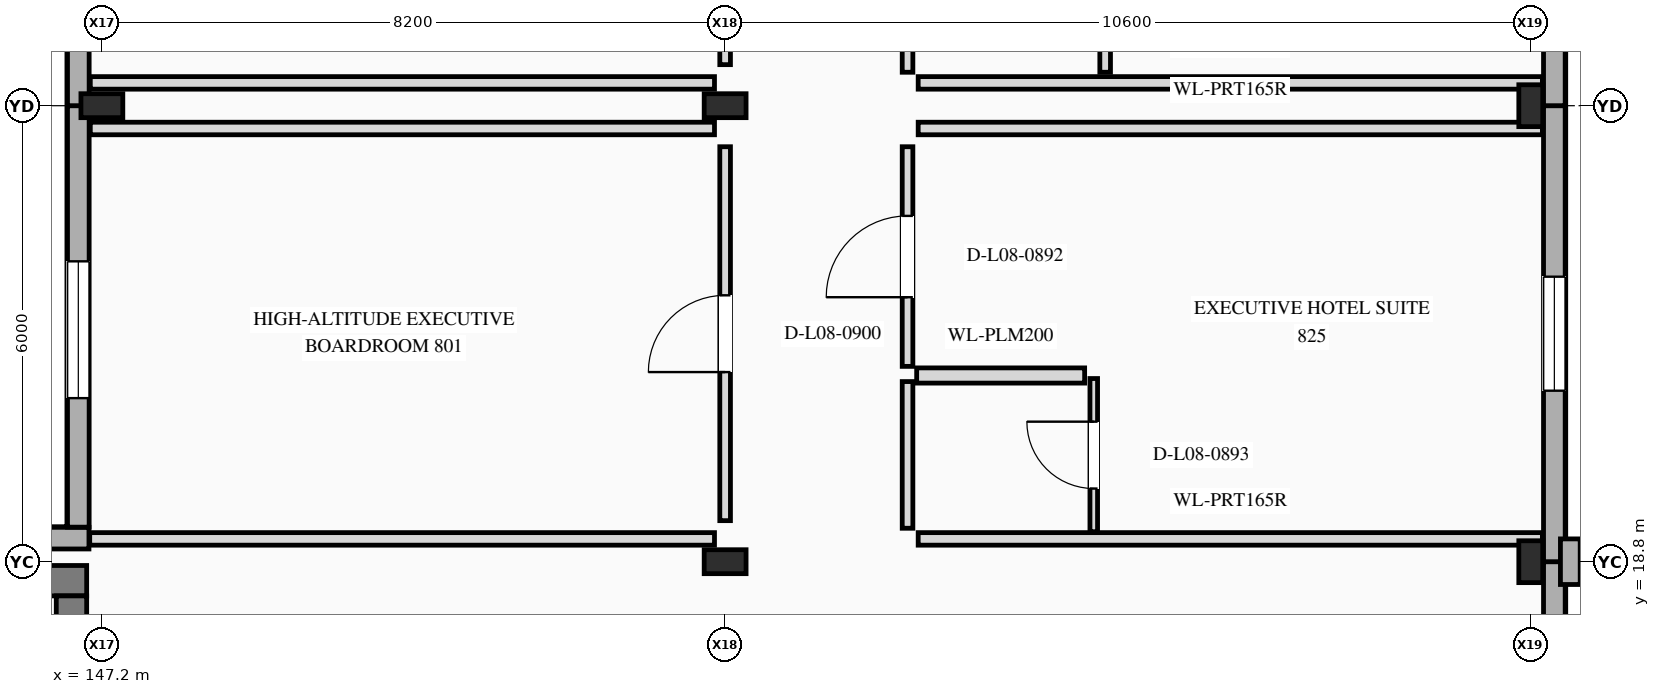
"""IFC4 building model, lengths in metres.
Left out: names, types, materials, properties, quantities, classifications, styles, units other than length and angle.
Written with IfcOpenShell. Run it as: python <this file> out.ifc"""

import sys

from ifc_helpers import new_model, si_unit, direction, frame, frame_2d, origin, origin_2d, place, context, subcontext, project, spatial, rectangle, i_section, extrude, element, fill, save


model = new_model("IFC4")
c1 = context("Model", 3, precision=1e-05, world=origin(), true_north=direction((0.0, 1.0)))
c2 = subcontext(c1, "Body", "Model", "MODEL_VIEW")
j1 = project(units=[si_unit("LENGTHUNIT", "METRE"), si_unit("PLANEANGLEUNIT", "RADIAN")], contexts=[c1])
p1 = place(None, origin())
s1 = spatial("IfcSite", under=j1, at=p1, CompositionType="ELEMENT")
p2 = place(p1, origin())
s2 = spatial("IfcBuilding", under=s1, at=p2, CompositionType="ELEMENT")
p3 = place(p2, frame((0.0, 0.0, 34.1)))
s3 = spatial("IfcBuildingStorey", under=s2, at=p3, CompositionType="ELEMENT", Elevation=34.1)
for number, where, z_axis, x_axis in (
    (1, (147.2, 24.8, 0.0), (0.0, 0.0, 1.0), (0.0, 1.0, 0.0)),
    (2, (155.4, 18.8, 0.0), (0.0, 0.0, 1.0), (0.0, 1.0, 0.0)),
    (3, (155.4, 24.8, 0.0), (0.0, 0.0, 1.0), (0.0, 1.0, 0.0)),
    (4, (166.0, 18.8, 0.0), (0.0, 0.0, 1.0), (1.0, 0.0, 0.0)),
    (5, (166.0, 24.8, 0.0), (0.0, 0.0, 1.0), (1.0, 0.0, 0.0)),
):
    element("IfcColumn", number, at=place(p3, frame(where, z_axis=z_axis, x_axis=x_axis)), inside=s3, PredefinedType="COLUMN", context=c2, shape_type="SweptSolid", body=[
        extrude(i_section(OverallWidth=0.315, OverallDepth=0.551, WebThickness=0.015, FlangeThickness=0.024, at=origin_2d()), origin(), (0.0, 0.0, 1.0), 3.5),
    ])
p4 = place(p3, frame((166.31, 8.2, 0.0), z_axis=(0.0, 0.0, 1.0), x_axis=(0.0, 1.0, 0.0)))
e6 = element("IfcWall", 6, at=p4, inside=s3, PredefinedType="STANDARD", context=c2, shape_type="SweptSolid", body=[
    extrude(rectangle(XDim=10.6, YDim=0.285, at=frame_2d((5.3, 0.0))), origin(), (0.0, 0.0, 1.0), 3.5),
])
p5 = place(p4, frame((4.55, 0.0, 0.88)))
e7 = element("IfcOpeningElement", 7, at=p5, cuts=e6, PredefinedType="OPENING", context=c2, shape_type="SweptSolid", body=[
    extrude(rectangle(XDim=1.5, YDim=1.7, at=frame_2d((0.75, 0.85))), frame((0.0, 0.152, 0.0), z_axis=(0.0, -1.0, 0.0), x_axis=(1.0, 0.0, 0.0)), (0.0, 0.0, 1.0), 0.305),
])
p6 = place(p3, frame((166.31, 18.8, 0.0), z_axis=(0.0, 0.0, 1.0), x_axis=(0.0, 1.0, 0.0)))
e8 = element("IfcWall", 8, at=p6, inside=s3, PredefinedType="STANDARD", context=c2, shape_type="SweptSolid", body=[
    extrude(rectangle(XDim=6.0, YDim=0.285, at=frame_2d((3.0, 0.0))), origin(), (0.0, 0.0, 1.0), 3.5),
])
p7 = place(p6, frame((2.25, 0.0, 0.85)))
e9 = element("IfcOpeningElement", 9, at=p7, cuts=e8, PredefinedType="OPENING", context=c2, shape_type="SweptSolid", body=[
    extrude(rectangle(XDim=1.5, YDim=1.7, at=frame_2d((0.75, 0.85))), frame((0.0, 0.152, 0.0), z_axis=(0.0, -1.0, 0.0), x_axis=(1.0, 0.0, 0.0)), (0.0, 0.0, 1.0), 0.305),
])
p8 = place(p3, frame((166.52, 18.5, 0.0), z_axis=(0.0, 0.0, 1.0), x_axis=(0.0, 1.0, 0.0)))
e10 = element("IfcWall", 10, at=p8, inside=s3, PredefinedType="ELEMENTEDWALL", context=c2, shape_type="SweptSolid", body=[
    extrude(rectangle(XDim=0.6, YDim=0.26, at=frame_2d((0.3, 0.0))), origin(), (0.0, 0.0, 1.0), 3.5),
])
p9 = place(p3, frame((166.31, 24.8, 0.0), z_axis=(0.0, 0.0, 1.0), x_axis=(0.0, 1.0, 0.0)))
e11 = element("IfcWall", 11, at=p9, inside=s3, PredefinedType="STANDARD", context=c2, shape_type="SweptSolid", body=[
    extrude(rectangle(XDim=1.34, YDim=0.285, at=frame_2d((0.67, 0.0))), origin(), (0.0, 0.0, 1.0), 3.5),
])
p10 = place(p3, frame((147.03, 19.11, 0.0), z_axis=(0.0, 0.0, 1.0), x_axis=(-1.0, 0.0, 0.0)))
e12 = element("IfcWall", 12, at=p10, inside=s3, PredefinedType="STANDARD", context=c2, shape_type="SweptSolid", body=[
    extrude(rectangle(XDim=11.03, YDim=0.285, at=frame_2d((5.515, 0.0))), origin(), (0.0, 0.0, 1.0), 3.5),
])
p11 = place(p3, frame((146.89, 19.254, 0.0), z_axis=(0.0, 0.0, 1.0), x_axis=(0.0, 1.0, 0.0)))
e13 = element("IfcWall", 13, at=p11, inside=s3, PredefinedType="STANDARD", context=c2, shape_type="SweptSolid", body=[
    extrude(rectangle(XDim=5.546, YDim=0.285, at=frame_2d((2.773, 0.0))), origin(), (0.0, 0.0, 1.0), 3.5),
])
p12 = place(p11, frame((1.698, 0.0, 0.85)))
e14 = element("IfcOpeningElement", 14, at=p12, cuts=e13, PredefinedType="OPENING", context=c2, shape_type="SweptSolid", body=[
    extrude(rectangle(XDim=1.8, YDim=1.8, at=frame_2d((0.9, 0.9))), frame((0.0, 0.152, 0.0), z_axis=(0.0, -1.0, 0.0), x_axis=(1.0, 0.0, 0.0)), (0.0, 0.0, 1.0), 0.305),
])
p13 = place(p3, frame((146.89, 24.8, 0.0), z_axis=(0.0, 0.0, 1.0), x_axis=(0.0, 1.0, 0.0)))
e15 = element("IfcWall", 15, at=p13, inside=s3, PredefinedType="STANDARD", context=c2, shape_type="SweptSolid", body=[
    extrude(rectangle(XDim=8.4, YDim=0.285, at=frame_2d((4.2, 0.0))), origin(), (0.0, 0.0, 1.0), 3.5),
])
p14 = place(p13, frame((3.225, 0.0, 0.85)))
e16 = element("IfcOpeningElement", 16, at=p14, cuts=e15, PredefinedType="OPENING", context=c2, shape_type="SweptSolid", body=[
    extrude(rectangle(XDim=1.95, YDim=1.85, at=frame_2d((0.975, 0.925))), frame((0.0, 0.152, 0.0), z_axis=(0.0, -1.0, 0.0), x_axis=(1.0, 0.0, 0.0)), (0.0, 0.0, 1.0), 0.305),
])
p15 = place(p3, frame((147.0, 18.55, 0.0), z_axis=(0.0, 0.0, 1.0), x_axis=(-1.0, 0.0, 0.0)))
e17 = element("IfcWall", 17, at=p15, inside=s3, PredefinedType="SHEAR", context=c2, shape_type="SweptSolid", body=[
    extrude(rectangle(XDim=10.6, YDim=0.4, at=frame_2d((5.3, 0.0))), origin(), (0.0, 0.0, 1.0), 3.5),
])
p16 = place(p3, frame((146.8, 11.0, 0.0), z_axis=(0.0, 0.0, 1.0), x_axis=(0.0, 1.0, 0.0)))
e18 = element("IfcWall", 18, at=p16, inside=s3, PredefinedType="SHEAR", context=c2, shape_type="SweptSolid", body=[
    extrude(rectangle(XDim=7.35, YDim=0.4, at=frame_2d((3.675, 0.0))), origin(), (0.0, 0.0, 1.0), 3.5),
])
p17 = place(p16, frame((5.0, 0.0, 0.0)))
e19 = element("IfcOpeningElement", 19, at=p17, cuts=e18, PredefinedType="OPENING", context=c2, shape_type="SweptSolid", body=[
    extrude(rectangle(XDim=0.95, YDim=2.2, at=frame_2d((0.475, 1.1))), frame((0.0, 0.21, 0.0), z_axis=(0.0, -1.0, 0.0), x_axis=(1.0, 0.0, 0.0)), (0.0, 0.0, 1.0), 0.42),
])
p18 = place(p16, frame((0.175, 0.0, 0.0)))
e20 = element("IfcOpeningElement", 20, at=p18, cuts=e18, PredefinedType="OPENING", context=c2, shape_type="SweptSolid", body=[
    extrude(rectangle(XDim=1.15, YDim=2.25, at=frame_2d((0.575, 1.125))), frame((0.0, 0.21, 0.0), z_axis=(0.0, -1.0, 0.0), x_axis=(1.0, 0.0, 0.0)), (0.0, 0.0, 1.0), 0.42),
])
p19 = place(p16, frame((1.875, 0.0, 0.0)))
e21 = element("IfcOpeningElement", 21, at=p19, cuts=e18, PredefinedType="OPENING", context=c2, shape_type="SweptSolid", body=[
    extrude(rectangle(XDim=1.15, YDim=2.25, at=frame_2d((0.575, 1.125))), frame((0.0, 0.21, 0.0), z_axis=(0.0, -1.0, 0.0), x_axis=(1.0, 0.0, 0.0)), (0.0, 0.0, 1.0), 0.42),
])
p20 = place(p3, frame((157.8, 19.24, 0.0), z_axis=(0.0, 0.0, 1.0), x_axis=(0.0, 1.0, 0.0)))
e22 = element("IfcWall", 22, at=p20, inside=s3, PredefinedType="PARTITIONING", context=c2, shape_type="SweptSolid", body=[
    extrude(rectangle(XDim=1.93, YDim=0.14, at=frame_2d((0.965, 0.0))), origin(), (0.0, 0.0, 1.0), 2.748),
])
p21 = place(p3, frame((157.8, 21.37, 0.0), z_axis=(0.0, 0.0, 1.0), x_axis=(0.0, 1.0, 0.0)))
e23 = element("IfcWall", 23, at=p21, inside=s3, PredefinedType="PARTITIONING", context=c2, shape_type="SweptSolid", body=[
    extrude(rectangle(XDim=2.89, YDim=0.14, at=frame_2d((1.445, 0.0))), origin(), (0.0, 0.0, 1.0), 2.748),
])
p22 = place(p21, frame((0.91, 0.0, 0.0)))
e24 = element("IfcOpeningElement", 24, at=p22, cuts=e23, PredefinedType="OPENING", context=c2, shape_type="SweptSolid", body=[
    extrude(rectangle(XDim=1.07, YDim=2.4, at=frame_2d((0.535, 1.2))), frame((0.0, 0.08, 0.0), z_axis=(0.0, -1.0, 0.0), x_axis=(1.0, 0.0, 0.0)), (0.0, 0.0, 1.0), 0.16),
])
for number, where, z_axis, x_axis in (
    (25, (157.94, 19.1, 0.0), (0.0, 0.0, 1.0), (1.0, 0.0, 0.0)),
    (26, (157.94, 24.5, 0.0), (0.0, 0.0, 1.0), (1.0, 0.0, 0.0)),
):
    element("IfcWall", number, at=place(p3, frame(where, z_axis=z_axis, x_axis=x_axis)), inside=s3, PredefinedType="PARTITIONING", context=c2, shape_type="SweptSolid", body=[
        extrude(rectangle(XDim=8.213, YDim=0.165, at=frame_2d((4.106, 0.0))), origin(), (0.0, 0.0, 1.0), 2.58),
    ])
p23 = place(p3, frame((157.92, 21.25, 0.0), z_axis=(0.0, 0.0, 1.0), x_axis=(1.0, 0.0, 0.0)))
e27 = element("IfcWall", 27, at=p23, inside=s3, PredefinedType="PLUMBINGWALL", context=c2, shape_type="SweptSolid", body=[
    extrude(rectangle(XDim=2.21, YDim=0.2, at=frame_2d((1.105, 0.0))), origin(), (0.0, 0.0, 1.0), 3.19),
])
p24 = place(p3, frame((160.25, 19.195, 0.0), z_axis=(0.0, 0.0, 1.0), x_axis=(0.0, 1.0, 0.0)))
e28 = element("IfcWall", 28, at=p24, inside=s3, PredefinedType="PARTITIONING", context=c2, shape_type="SweptSolid", body=[
    extrude(rectangle(XDim=2.015, YDim=0.1, at=frame_2d((1.008, 0.0))), origin(), (0.0, 0.0, 1.0), 2.748),
])
p25 = place(p24, frame((0.568, 0.0, 0.0)))
e29 = element("IfcOpeningElement", 29, at=p25, cuts=e28, PredefinedType="OPENING", context=c2, shape_type="SweptSolid", body=[
    extrude(rectangle(XDim=0.88, YDim=2.1, at=frame_2d((0.44, 1.05))), frame((0.0, 0.06, 0.0), z_axis=(0.0, -1.0, 0.0), x_axis=(1.0, 0.0, 0.0)), (0.0, 0.0, 1.0), 0.12),
])
p26 = place(p3, frame((155.4, 19.34, 0.0), z_axis=(0.0, 0.0, 1.0), x_axis=(0.0, 1.0, 0.0)))
e30 = element("IfcWall", 30, at=p26, inside=s3, PredefinedType="PARTITIONING", context=c2, shape_type="SweptSolid", body=[
    extrude(rectangle(XDim=4.92, YDim=0.14, at=frame_2d((2.46, 0.0))), origin(), (0.0, 0.0, 1.0), 2.664),
])
p27 = place(p26, frame((1.955, 0.0, 0.0)))
e31 = element("IfcOpeningElement", 31, at=p27, cuts=e30, PredefinedType="OPENING", context=c2, shape_type="SweptSolid", body=[
    extrude(rectangle(XDim=1.01, YDim=2.2, at=frame_2d((0.505, 1.1))), frame((0.0, 0.08, 0.0), z_axis=(0.0, -1.0, 0.0), x_axis=(1.0, 0.0, 0.0)), (0.0, 0.0, 1.0), 0.16),
])
p28 = place(p3, frame((147.04, 19.1, 0.0), z_axis=(0.0, 0.0, 1.0), x_axis=(1.0, 0.0, 0.0)))
e32 = element("IfcWall", 32, at=p28, inside=s3, PredefinedType="PARTITIONING", context=c2, shape_type="SweptSolid", body=[
    extrude(rectangle(XDim=8.22, YDim=0.165, at=frame_2d((4.11, 0.0))), origin(), (0.0, 0.0, 1.0), 3.19),
])
p29 = place(p3, frame((147.048, 24.5, 0.0), z_axis=(0.0, 0.0, 1.0), x_axis=(1.0, 0.0, 0.0)))
e33 = element("IfcWall", 33, at=p29, inside=s3, PredefinedType="PARTITIONING", context=c2, shape_type="SweptSolid", body=[
    extrude(rectangle(XDim=8.212, YDim=0.165, at=frame_2d((4.106, 0.0))), origin(), (0.0, 0.0, 1.0), 2.603),
])
p30 = place(p3, frame((157.8, 25.24, 0.0), z_axis=(0.0, 0.0, 1.0), x_axis=(0.0, 1.0, 0.0)))
e34 = element("IfcWall", 34, at=p30, inside=s3, PredefinedType="PARTITIONING", context=c2, shape_type="SweptSolid", body=[
    extrude(rectangle(XDim=2.28, YDim=0.14, at=frame_2d((1.14, 0.0))), origin(), (0.0, 0.0, 1.0), 2.743),
])
p31 = place(p30, frame((0.66, 0.0, 0.0)))
e35 = element("IfcOpeningElement", 35, at=p31, cuts=e34, PredefinedType="OPENING", context=c2, shape_type="SweptSolid", body=[
    extrude(rectangle(XDim=0.96, YDim=2.15, at=frame_2d((0.48, 1.075))), frame((0.0, 0.08, 0.0), z_axis=(0.0, -1.0, 0.0), x_axis=(1.0, 0.0, 0.0)), (0.0, 0.0, 1.0), 0.16),
])
p32 = place(p3, frame((160.4, 25.24, 0.0), z_axis=(0.0, 0.0, 1.0), x_axis=(0.0, 1.0, 0.0)))
e36 = element("IfcWall", 36, at=p32, inside=s3, PredefinedType="PARTITIONING", context=c2, shape_type="SweptSolid", body=[
    extrude(rectangle(XDim=2.22, YDim=0.14, at=frame_2d((1.11, 0.0))), origin(), (0.0, 0.0, 1.0), 2.743),
])
p33 = place(p3, frame((157.94, 25.1, 0.0), z_axis=(0.0, 0.0, 1.0), x_axis=(1.0, 0.0, 0.0)))
e37 = element("IfcWall", 37, at=p33, inside=s3, PredefinedType="PARTITIONING", context=c2, shape_type="SweptSolid", body=[
    extrude(rectangle(XDim=8.213, YDim=0.165, at=frame_2d((4.106, 0.0))), origin(), (0.0, 0.0, 1.0), 2.58),
])
p34 = place(p3, frame((155.4, 25.34, 0.0), z_axis=(0.0, 0.0, 1.0), x_axis=(0.0, 1.0, 0.0)))
e38 = element("IfcWall", 38, at=p34, inside=s3, PredefinedType="PARTITIONING", context=c2, shape_type="SweptSolid", body=[
    extrude(rectangle(XDim=7.32, YDim=0.14, at=frame_2d((3.66, 0.0))), origin(), (0.0, 0.0, 1.0), 2.664),
])
p35 = place(p34, frame((3.125, 0.0, 0.0)))
e39 = element("IfcOpeningElement", 39, at=p35, cuts=e38, PredefinedType="OPENING", context=c2, shape_type="SweptSolid", body=[
    extrude(rectangle(XDim=1.07, YDim=2.25, at=frame_2d((0.535, 1.125))), frame((0.0, 0.08, 0.0), z_axis=(0.0, -1.0, 0.0), x_axis=(1.0, 0.0, 0.0)), (0.0, 0.0, 1.0), 0.16),
])
p36 = place(p3, frame((147.048, 25.1, 0.0), z_axis=(0.0, 0.0, 1.0), x_axis=(1.0, 0.0, 0.0)))
e40 = element("IfcWall", 40, at=p36, inside=s3, PredefinedType="PARTITIONING", context=c2, shape_type="SweptSolid", body=[
    extrude(rectangle(XDim=8.212, YDim=0.165, at=frame_2d((4.106, 0.0))), origin(), (0.0, 0.0, 1.0), 2.603),
])
p37 = place(p7, origin())
e41 = element("IfcWindow", 41, at=p37, inside=s3, PartitioningType="SINGLE_PANEL", PredefinedType="WINDOW", context=c2, shape_type="SweptSolid", body=[
    extrude(rectangle(XDim=1.5, YDim=1.7, at=frame_2d((0.75, 0.85))), frame((0.0, 0.03, 0.0), z_axis=(0.0, -1.0, 0.0), x_axis=(1.0, 0.0, 0.0)), (0.0, 0.0, 1.0), 0.06),
])
fill(e9, e41)
p38 = place(p12, origin())
e42 = element("IfcWindow", 42, at=p38, inside=s3, PartitioningType="SINGLE_PANEL", PredefinedType="WINDOW", context=c2, shape_type="SweptSolid", body=[
    extrude(rectangle(XDim=1.8, YDim=1.8, at=frame_2d((0.9, 0.9))), frame((0.0, 0.03, 0.0), z_axis=(0.0, -1.0, 0.0), x_axis=(1.0, 0.0, 0.0)), (0.0, 0.0, 1.0), 0.06),
])
fill(e14, e42)
p39 = place(p22, origin())
e43 = element("IfcDoor", 43, at=p39, inside=s3, OperationType="SINGLE_SWING_LEFT", PredefinedType="DOOR", context=c2, shape_type="SweptSolid", body=[
    extrude(rectangle(XDim=1.07, YDim=2.4, at=frame_2d((0.535, 1.2))), frame((0.0, 0.025, 0.0), z_axis=(0.0, -1.0, 0.0), x_axis=(1.0, 0.0, 0.0)), (0.0, 0.0, 1.0), 0.05),
])
fill(e24, e43)
p40 = place(p25, origin())
e44 = element("IfcDoor", 44, at=p40, inside=s3, OperationType="SINGLE_SWING_RIGHT", PredefinedType="DOOR", context=c2, shape_type="SweptSolid", body=[
    extrude(rectangle(XDim=0.88, YDim=2.1, at=frame_2d((0.44, 1.05))), frame((0.0, 0.025, 0.0), z_axis=(0.0, -1.0, 0.0), x_axis=(1.0, 0.0, 0.0)), (0.0, 0.0, 1.0), 0.05),
])
fill(e29, e44)
p41 = place(p27, origin())
e45 = element("IfcDoor", 45, at=p41, inside=s3, OperationType="SINGLE_SWING_LEFT", PredefinedType="DOOR", context=c2, shape_type="SweptSolid", body=[
    extrude(rectangle(XDim=1.01, YDim=2.2, at=frame_2d((0.505, 1.1))), frame((0.0, 0.025, 0.0), z_axis=(0.0, -1.0, 0.0), x_axis=(1.0, 0.0, 0.0)), (0.0, 0.0, 1.0), 0.05),
])
fill(e31, e45)
save(model, sys.argv[1])
